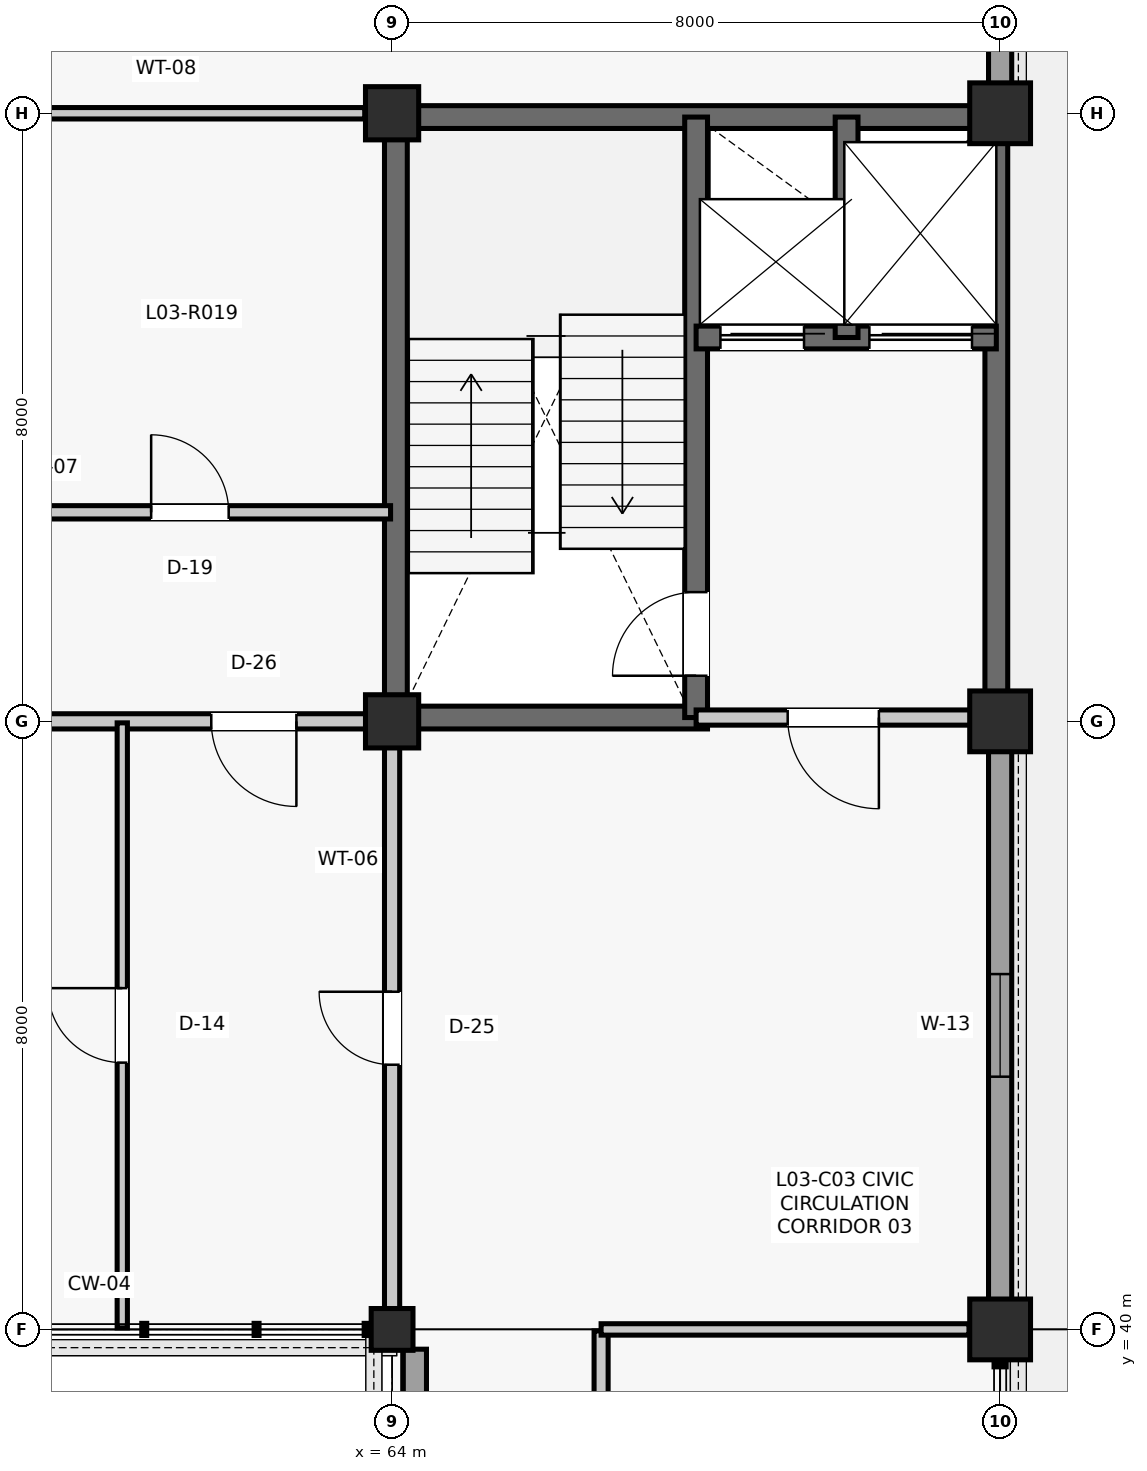
"""IFC4 building model, lengths in metres.
Left out: names, types, materials, properties, quantities, classifications, styles, units other than length and angle.
Written with IfcOpenShell. Run it as: python <this file> out.ifc"""

import sys

from ifc_helpers import new_model, si_unit, direction, frame, frame_2d, origin, origin_2d, place, context, subcontext, project, spatial, rectangle, extrude, element, fill, save


model = new_model("IFC4")
c1 = context("Model", 3, precision=1e-05, world=origin(), true_north=direction((0.0, 1.0)))
c2 = subcontext(c1, "Body", "Model", "MODEL_VIEW")
j1 = project(units=[si_unit("LENGTHUNIT", "METRE"), si_unit("PLANEANGLEUNIT", "RADIAN")], contexts=[c1])
p1 = place(None, origin())
s1 = spatial("IfcSite", under=j1, at=p1, CompositionType="ELEMENT")
p2 = place(p1, origin())
s2 = spatial("IfcBuilding", under=s1, at=p2, CompositionType="ELEMENT")
p3 = place(p2, frame((0.0, 0.0, 13.86)))
s3 = spatial("IfcBuildingStorey", under=s2, at=p3, CompositionType="ELEMENT", Elevation=13.86)
p4 = place(p3, frame((64.0, 40.0, 0.0), z_axis=(0.0, 0.0, 1.0), x_axis=(1.0, 0.0, 0.0)))
e1 = element("IfcColumn", 1, at=p4, inside=s3, PredefinedType="COLUMN", context=c2, shape_type="SweptSolid", body=[
    extrude(rectangle(XDim=0.55, YDim=0.55, at=origin_2d()), origin(), (0.0, 0.0, 1.0), 3.96),
])
for number, where, z_axis, x_axis in (
    (2, (64.0, 48.0, 0.0), (0.0, 0.0, 1.0), (1.0, 0.0, 0.0)),
    (3, (64.0, 56.0, 0.0), (0.0, 0.0, 1.0), (1.0, 0.0, 0.0)),
):
    element("IfcColumn", number, at=place(p3, frame(where, z_axis=z_axis, x_axis=x_axis)), inside=s3, PredefinedType="COLUMN", context=c2, shape_type="SweptSolid", body=[
        extrude(rectangle(XDim=0.7, YDim=0.7, at=origin_2d()), origin(), (0.0, 0.0, 1.0), 3.96),
    ])
for number, where, z_axis, x_axis in (
    (4, (72.0, 40.0, 0.0), (0.0, 0.0, 1.0), (1.0, 0.0, 0.0)),
    (5, (72.0, 48.0, 0.0), (0.0, 0.0, 1.0), (1.0, 0.0, 0.0)),
    (6, (72.0, 56.0, 0.0), (0.0, 0.0, 1.0), (1.0, 0.0, 0.0)),
):
    element("IfcColumn", number, at=place(p3, frame(where, z_axis=z_axis, x_axis=x_axis)), inside=s3, PredefinedType="COLUMN", context=c2, shape_type="SweptSolid", body=[
        extrude(rectangle(XDim=0.8, YDim=0.8, at=origin_2d()), origin(), (0.0, 0.0, 1.0), 3.96),
    ])
p5 = place(p3, frame((64.3, 32.26, 0.0), z_axis=(0.0, 0.0, 1.0), x_axis=(0.0, 1.0, 0.0)))
e7 = element("IfcWall", 7, at=p5, inside=s3, PredefinedType="SOLIDWALL", context=c2, shape_type="SweptSolid", body=[
    extrude(rectangle(XDim=7.48, YDim=0.305, at=frame_2d((3.74, 0.0))), origin(), (0.0, 0.0, 1.0), 3.367),
])
p6 = place(p3, frame((72.0, 40.385, 0.0), z_axis=(0.0, 0.0, 1.0), x_axis=(0.0, 1.0, 0.0)))
e8 = element("IfcWall", 8, at=p6, inside=s3, PredefinedType="SOLIDWALL", context=c2, shape_type="SweptSolid", body=[
    extrude(rectangle(XDim=7.23, YDim=0.305, at=frame_2d((3.615, 0.0))), origin(), (0.0, 0.0, 1.0), 3.364),
])
p7 = place(p6, frame((2.94, 0.0, 0.9)))
e9 = element("IfcOpeningElement", 9, at=p7, cuts=e8, PredefinedType="OPENING", context=c2, shape_type="SweptSolid", body=[
    extrude(rectangle(XDim=1.35, YDim=1.9, at=frame_2d((0.675, 0.95))), frame((0.0, 0.162, 0.0), z_axis=(0.0, -1.0, 0.0), x_axis=(1.0, 0.0, 0.0)), (0.0, 0.0, 1.0), 0.325),
])
p8 = place(p3, frame((72.0, 56.385, 0.0), z_axis=(0.0, 0.0, 1.0), x_axis=(0.0, 1.0, 0.0)))
e10 = element("IfcWall", 10, at=p8, inside=s3, PredefinedType="SOLIDWALL", context=c2, shape_type="SweptSolid", body=[
    extrude(rectangle(XDim=7.23, YDim=0.305, at=frame_2d((3.615, 0.0))), origin(), (0.0, 0.0, 1.0), 3.367),
])
p9 = place(p8, frame((0.726, 0.0, 0.95)))
e11 = element("IfcOpeningElement", 11, at=p9, cuts=e10, PredefinedType="OPENING", context=c2, shape_type="SweptSolid", body=[
    extrude(rectangle(XDim=1.15, YDim=1.65, at=frame_2d((0.575, 0.825))), frame((0.0, 0.162, 0.0), z_axis=(0.0, -1.0, 0.0), x_axis=(1.0, 0.0, 0.0)), (0.0, 0.0, 1.0), 0.325),
])
p10 = place(p8, frame((5.354, 0.0, 0.95)))
e12 = element("IfcOpeningElement", 12, at=p10, cuts=e10, PredefinedType="OPENING", context=c2, shape_type="SweptSolid", body=[
    extrude(rectangle(XDim=1.15, YDim=1.65, at=frame_2d((0.575, 0.825))), frame((0.0, 0.162, 0.0), z_axis=(0.0, -1.0, 0.0), x_axis=(1.0, 0.0, 0.0)), (0.0, 0.0, 1.0), 0.325),
])
p11 = place(p3, frame((64.05, 48.24, 0.0), z_axis=(0.0, 0.0, 1.0), x_axis=(0.0, 1.0, 0.0)))
e13 = element("IfcWall", 13, at=p11, inside=s3, PredefinedType="SHEAR", context=c2, shape_type="SweptSolid", body=[
    extrude(rectangle(XDim=7.52, YDim=0.3, at=frame_2d((3.76, 0.0))), origin(), (0.0, 0.0, 1.0), 3.725),
])
p12 = place(p3, frame((64.24, 55.95, 0.0), z_axis=(0.0, 0.0, 1.0), x_axis=(1.0, 0.0, 0.0)))
e14 = element("IfcWall", 14, at=p12, inside=s3, PredefinedType="SHEAR", context=c2, shape_type="SweptSolid", body=[
    extrude(rectangle(XDim=7.47, YDim=0.3, at=frame_2d((3.735, 0.0))), origin(), (0.0, 0.0, 1.0), 3.725),
])
p13 = place(p3, frame((71.95, 48.29, 0.0), z_axis=(0.0, 0.0, 1.0), x_axis=(0.0, 1.0, 0.0)))
e15 = element("IfcWall", 15, at=p13, inside=s3, PredefinedType="SHEAR", context=c2, shape_type="SweptSolid", body=[
    extrude(rectangle(XDim=7.42, YDim=0.3, at=frame_2d((3.71, 0.0))), origin(), (0.0, 0.0, 1.0), 3.725),
])
p14 = place(p3, frame((64.24, 48.05, 0.0), z_axis=(0.0, 0.0, 1.0), x_axis=(1.0, 0.0, 0.0)))
e16 = element("IfcWall", 16, at=p14, inside=s3, PredefinedType="SHEAR", context=c2, shape_type="SweptSolid", body=[
    extrude(rectangle(XDim=3.91, YDim=0.3, at=frame_2d((1.955, 0.0))), origin(), (0.0, 0.0, 1.0), 3.725),
])
p15 = place(p3, frame((68.0, 48.05, 0.0), z_axis=(0.0, 0.0, 1.0), x_axis=(0.0, 1.0, 0.0)))
e17 = element("IfcWall", 17, at=p15, inside=s3, PredefinedType="SHEAR", context=c2, shape_type="SweptSolid", body=[
    extrude(rectangle(XDim=7.9, YDim=0.3, at=frame_2d((3.95, 0.0))), origin(), (0.0, 0.0, 1.0), 3.725),
])
p16 = place(p15, frame((0.55, 0.0, 0.0)))
e18 = element("IfcOpeningElement", 18, at=p16, cuts=e17, PredefinedType="OPENING", context=c2, shape_type="SweptSolid", body=[
    extrude(rectangle(XDim=1.1, YDim=2.15, at=frame_2d((0.55, 1.075))), frame((0.0, 0.16, 0.0), z_axis=(0.0, -1.0, 0.0), x_axis=(1.0, 0.0, 0.0)), (0.0, 0.0, 1.0), 0.32),
])
p17 = place(p3, frame((68.0, 53.05, 0.0), z_axis=(0.0, 0.0, 1.0), x_axis=(1.0, 0.0, 0.0)))
e19 = element("IfcWall", 19, at=p17, inside=s3, PredefinedType="SHEAR", context=c2, shape_type="SweptSolid", body=[
    extrude(rectangle(XDim=3.95, YDim=0.3, at=frame_2d((1.975, 0.0))), origin(), (0.0, 0.0, 1.0), 3.725),
])
p18 = place(p17, frame((0.32, 0.0, 0.0)))
e20 = element("IfcOpeningElement", 20, at=p18, cuts=e19, PredefinedType="OPENING", context=c2, shape_type="SweptSolid", body=[
    extrude(rectangle(XDim=1.1, YDim=2.2, at=frame_2d((0.55, 1.1))), frame((0.0, 0.16, 0.0), z_axis=(0.0, -1.0, 0.0), x_axis=(1.0, 0.0, 0.0)), (0.0, 0.0, 1.0), 0.32),
])
p19 = place(p17, frame((2.28, 0.0, 0.0)))
e21 = element("IfcOpeningElement", 21, at=p19, cuts=e19, PredefinedType="OPENING", context=c2, shape_type="SweptSolid", body=[
    extrude(rectangle(XDim=1.35, YDim=2.3, at=frame_2d((0.675, 1.15))), frame((0.0, 0.16, 0.0), z_axis=(0.0, -1.0, 0.0), x_axis=(1.0, 0.0, 0.0)), (0.0, 0.0, 1.0), 0.32),
])
p20 = place(p3, frame((69.98, 53.05, 0.0), z_axis=(0.0, 0.0, 1.0), x_axis=(0.0, 1.0, 0.0)))
e22 = element("IfcWall", 22, at=p20, inside=s3, PredefinedType="SHEAR", context=c2, shape_type="SweptSolid", body=[
    extrude(rectangle(XDim=2.9, YDim=0.3, at=frame_2d((1.45, 0.0))), origin(), (0.0, 0.0, 1.0), 3.725),
])
p21 = place(p3, frame((68.0, 48.05, 0.0), z_axis=(0.0, 0.0, 1.0), x_axis=(1.0, 0.0, 0.0)))
e23 = element("IfcWall", 23, at=p21, inside=s3, PredefinedType="PARTITIONING", context=c2, shape_type="SweptSolid", body=[
    extrude(rectangle(XDim=3.61, YDim=0.2, at=frame_2d((1.805, 0.0))), origin(), (0.0, 0.0, 1.0), 3.241),
])
p22 = place(p21, frame((1.205, 0.0, 0.0)))
e24 = element("IfcOpeningElement", 24, at=p22, cuts=e23, PredefinedType="OPENING", context=c2, shape_type="SweptSolid", body=[
    extrude(rectangle(XDim=1.2, YDim=2.15, at=frame_2d((0.6, 1.075))), frame((0.0, 0.11, 0.0), z_axis=(0.0, -1.0, 0.0), x_axis=(1.0, 0.0, 0.0)), (0.0, 0.0, 1.0), 0.22),
])
p23 = place(p3, frame((58.7, 50.75, 0.0), z_axis=(0.0, 0.0, 1.0), x_axis=(1.0, 0.0, 0.0)))
e25 = element("IfcWall", 25, at=p23, inside=s3, PredefinedType="PARTITIONING", context=c2, shape_type="SweptSolid", body=[
    extrude(rectangle(XDim=5.28, YDim=0.175, at=frame_2d((2.64, 0.0))), origin(), (0.0, 0.0, 1.0), 3.358),
])
p24 = place(p23, frame((2.13, 0.0, 0.0)))
e26 = element("IfcOpeningElement", 26, at=p24, cuts=e25, PredefinedType="OPENING", context=c2, shape_type="SweptSolid", body=[
    extrude(rectangle(XDim=1.02, YDim=2.2, at=frame_2d((0.51, 1.1))), frame((0.0, 0.097, 0.0), z_axis=(0.0, -1.0, 0.0), x_axis=(1.0, 0.0, 0.0)), (0.0, 0.0, 1.0), 0.195),
])
p25 = place(p3, frame((58.75, 56.0, 0.0), z_axis=(0.0, 0.0, 1.0), x_axis=(1.0, 0.0, 0.0)))
e27 = element("IfcWall", 27, at=p25, inside=s3, PredefinedType="PARTITIONING", context=c2, shape_type="SweptSolid", body=[
    extrude(rectangle(XDim=4.89, YDim=0.15, at=frame_2d((2.445, 0.0))), origin(), (0.0, 0.0, 1.0), 3.241),
])
p26 = place(p3, frame((66.75, 32.02, 0.0), z_axis=(0.0, 0.0, 1.0), x_axis=(0.0, 1.0, 0.0)))
e28 = element("IfcWall", 28, at=p26, inside=s3, PredefinedType="PARTITIONING", context=c2, shape_type="SweptSolid", body=[
    extrude(rectangle(XDim=7.96, YDim=0.185, at=frame_2d((3.98, 0.0))), origin(), (0.0, 0.0, 1.0), 3.247),
])
p27 = place(p26, frame((3.5, 0.0, 0.0)))
e29 = element("IfcOpeningElement", 29, at=p27, cuts=e28, PredefinedType="OPENING", context=c2, shape_type="SweptSolid", body=[
    extrude(rectangle(XDim=0.96, YDim=2.14, at=frame_2d((0.48, 1.07))), frame((0.0, 0.103, 0.0), z_axis=(0.0, -1.0, 0.0), x_axis=(1.0, 0.0, 0.0)), (0.0, 0.0, 1.0), 0.205),
])
p28 = place(p3, frame((66.75, 40.0, 0.0), z_axis=(0.0, 0.0, 1.0), x_axis=(1.0, 0.0, 0.0)))
e30 = element("IfcWall", 30, at=p28, inside=s3, PredefinedType="PARTITIONING", context=c2, shape_type="SweptSolid", body=[
    extrude(rectangle(XDim=4.84, YDim=0.15, at=frame_2d((2.42, 0.0))), origin(), (0.0, 0.0, 1.0), 3.253),
])
p29 = place(p3, frame((64.0, 40.265, 0.0), z_axis=(0.0, 0.0, 1.0), x_axis=(0.0, 1.0, 0.0)))
e31 = element("IfcWall", 31, at=p29, inside=s3, PredefinedType="PARTITIONING", context=c2, shape_type="SweptSolid", body=[
    extrude(rectangle(XDim=7.395, YDim=0.2, at=frame_2d((3.698, 0.0))), origin(), (0.0, 0.0, 1.0), 3.253),
])
p30 = place(p29, frame((3.218, 0.0, 0.0)))
e32 = element("IfcOpeningElement", 32, at=p30, cuts=e31, PredefinedType="OPENING", context=c2, shape_type="SweptSolid", body=[
    extrude(rectangle(XDim=0.96, YDim=2.14, at=frame_2d((0.48, 1.07))), frame((0.0, 0.11, 0.0), z_axis=(0.0, -1.0, 0.0), x_axis=(1.0, 0.0, 0.0)), (0.0, 0.0, 1.0), 0.22),
])
p31 = place(p3, frame((56.265, 48.0, 0.0), z_axis=(0.0, 0.0, 1.0), x_axis=(1.0, 0.0, 0.0)))
e33 = element("IfcWall", 33, at=p31, inside=s3, PredefinedType="PARTITIONING", context=c2, shape_type="SweptSolid", body=[
    extrude(rectangle(XDim=7.395, YDim=0.2, at=frame_2d((3.698, 0.0))), origin(), (0.0, 0.0, 1.0), 3.253),
])
p32 = place(p31, frame((1.289, 0.0, 0.0)))
e34 = element("IfcOpeningElement", 34, at=p32, cuts=e33, PredefinedType="OPENING", context=c2, shape_type="SweptSolid", body=[
    extrude(rectangle(XDim=1.12, YDim=2.22, at=frame_2d((0.56, 1.11))), frame((0.0, 0.11, 0.0), z_axis=(0.0, -1.0, 0.0), x_axis=(1.0, 0.0, 0.0)), (0.0, 0.0, 1.0), 0.22),
])
p33 = place(p31, frame((5.356, 0.0, 0.0)))
e35 = element("IfcOpeningElement", 35, at=p33, cuts=e33, PredefinedType="OPENING", context=c2, shape_type="SweptSolid", body=[
    extrude(rectangle(XDim=1.12, YDim=2.22, at=frame_2d((0.56, 1.11))), frame((0.0, 0.11, 0.0), z_axis=(0.0, -1.0, 0.0), x_axis=(1.0, 0.0, 0.0)), (0.0, 0.0, 1.0), 0.22),
])
p34 = place(p3, frame((60.45, 40.02, 0.0), z_axis=(0.0, 0.0, 1.0), x_axis=(0.0, 1.0, 0.0)))
e36 = element("IfcWall", 36, at=p34, inside=s3, PredefinedType="PARTITIONING", context=c2, shape_type="SweptSolid", body=[
    extrude(rectangle(XDim=7.96, YDim=0.135, at=frame_2d((3.98, 0.0))), origin(), (0.0, 0.0, 1.0), 3.253),
])
p35 = place(p34, frame((3.49, 0.0, 0.0)))
e37 = element("IfcOpeningElement", 37, at=p35, cuts=e36, PredefinedType="OPENING", context=c2, shape_type="SweptSolid", body=[
    extrude(rectangle(XDim=0.98, YDim=2.15, at=frame_2d((0.49, 1.075))), frame((0.0, 0.077, 0.0), z_axis=(0.0, -1.0, 0.0), x_axis=(1.0, 0.0, 0.0)), (0.0, 0.0, 1.0), 0.155),
])
p36 = place(p7, origin())
e38 = element("IfcWindow", 38, at=p36, inside=s3, PartitioningType="SINGLE_PANEL", PredefinedType="WINDOW", context=c2, shape_type="SweptSolid", body=[
    extrude(rectangle(XDim=1.35, YDim=1.9, at=frame_2d((0.675, 0.95))), frame((0.0, 0.03, 0.0), z_axis=(0.0, -1.0, 0.0), x_axis=(1.0, 0.0, 0.0)), (0.0, 0.0, 1.0), 0.06),
])
fill(e9, e38)
p37 = place(p16, origin())
e39 = element("IfcDoor", 39, at=p37, inside=s3, OperationType="SINGLE_SWING_LEFT", PredefinedType="DOOR", context=c2, shape_type="SweptSolid", body=[
    extrude(rectangle(XDim=1.1, YDim=2.15, at=frame_2d((0.55, 1.075))), frame((0.0, 0.025, 0.0), z_axis=(0.0, -1.0, 0.0), x_axis=(1.0, 0.0, 0.0)), (0.0, 0.0, 1.0), 0.05),
])
fill(e18, e39)
p38 = place(p18, origin())
e40 = element("IfcDoor", 40, at=p38, inside=s3, OperationType="SLIDING_TO_LEFT", PredefinedType="DOOR", context=c2, shape_type="SweptSolid", body=[
    extrude(rectangle(XDim=1.1, YDim=2.2, at=frame_2d((0.55, 1.1))), frame((0.0, 0.025, 0.0), z_axis=(0.0, -1.0, 0.0), x_axis=(1.0, 0.0, 0.0)), (0.0, 0.0, 1.0), 0.05),
])
fill(e20, e40)
p39 = place(p19, origin())
e41 = element("IfcDoor", 41, at=p39, inside=s3, OperationType="DOUBLE_DOOR_SLIDING", PredefinedType="DOOR", context=c2, shape_type="SweptSolid", body=[
    extrude(rectangle(XDim=1.35, YDim=2.3, at=frame_2d((0.675, 1.15))), frame((0.0, 0.025, 0.0), z_axis=(0.0, -1.0, 0.0), x_axis=(1.0, 0.0, 0.0)), (0.0, 0.0, 1.0), 0.05),
])
fill(e21, e41)
p40 = place(p22, frame((1.2, 0.0, 0.0), z_axis=(0.0, 0.0, 1.0), x_axis=(-1.0, 0.0, 0.0)))
e42 = element("IfcDoor", 42, at=p40, inside=s3, OperationType="SINGLE_SWING_RIGHT", PredefinedType="DOOR", context=c2, shape_type="SweptSolid", body=[
    extrude(rectangle(XDim=1.2, YDim=2.15, at=frame_2d((0.6, 1.075))), frame((0.0, 0.025, 0.0), z_axis=(0.0, -1.0, 0.0), x_axis=(1.0, 0.0, 0.0)), (0.0, 0.0, 1.0), 0.05),
])
fill(e24, e42)
p41 = place(p24, origin())
e43 = element("IfcDoor", 43, at=p41, inside=s3, OperationType="SINGLE_SWING_LEFT", PredefinedType="DOOR", context=c2, shape_type="SweptSolid", body=[
    extrude(rectangle(XDim=1.02, YDim=2.2, at=frame_2d((0.51, 1.1))), frame((0.0, 0.025, 0.0), z_axis=(0.0, -1.0, 0.0), x_axis=(1.0, 0.0, 0.0)), (0.0, 0.0, 1.0), 0.05),
])
fill(e26, e43)
p42 = place(p30, origin())
e44 = element("IfcDoor", 44, at=p42, inside=s3, OperationType="SINGLE_SWING_RIGHT", PredefinedType="DOOR", context=c2, shape_type="SweptSolid", body=[
    extrude(rectangle(XDim=0.96, YDim=2.14, at=frame_2d((0.48, 1.07))), frame((0.0, 0.025, 0.0), z_axis=(0.0, -1.0, 0.0), x_axis=(1.0, 0.0, 0.0)), (0.0, 0.0, 1.0), 0.05),
])
fill(e32, e44)
p43 = place(p33, frame((1.12, 0.0, 0.0), z_axis=(0.0, 0.0, 1.0), x_axis=(-1.0, 0.0, 0.0)))
e45 = element("IfcDoor", 45, at=p43, inside=s3, OperationType="SINGLE_SWING_RIGHT", PredefinedType="DOOR", context=c2, shape_type="SweptSolid", body=[
    extrude(rectangle(XDim=1.12, YDim=2.22, at=frame_2d((0.56, 1.11))), frame((0.0, 0.025, 0.0), z_axis=(0.0, -1.0, 0.0), x_axis=(1.0, 0.0, 0.0)), (0.0, 0.0, 1.0), 0.05),
])
fill(e35, e45)
p44 = place(p35, origin())
e46 = element("IfcDoor", 46, at=p44, inside=s3, OperationType="SINGLE_SWING_RIGHT", PredefinedType="DOOR", context=c2, shape_type="SweptSolid", body=[
    extrude(rectangle(XDim=0.98, YDim=2.15, at=frame_2d((0.49, 1.075))), frame((0.0, 0.025, 0.0), z_axis=(0.0, -1.0, 0.0), x_axis=(1.0, 0.0, 0.0)), (0.0, 0.0, 1.0), 0.05),
])
fill(e37, e46)
save(model, sys.argv[1])
